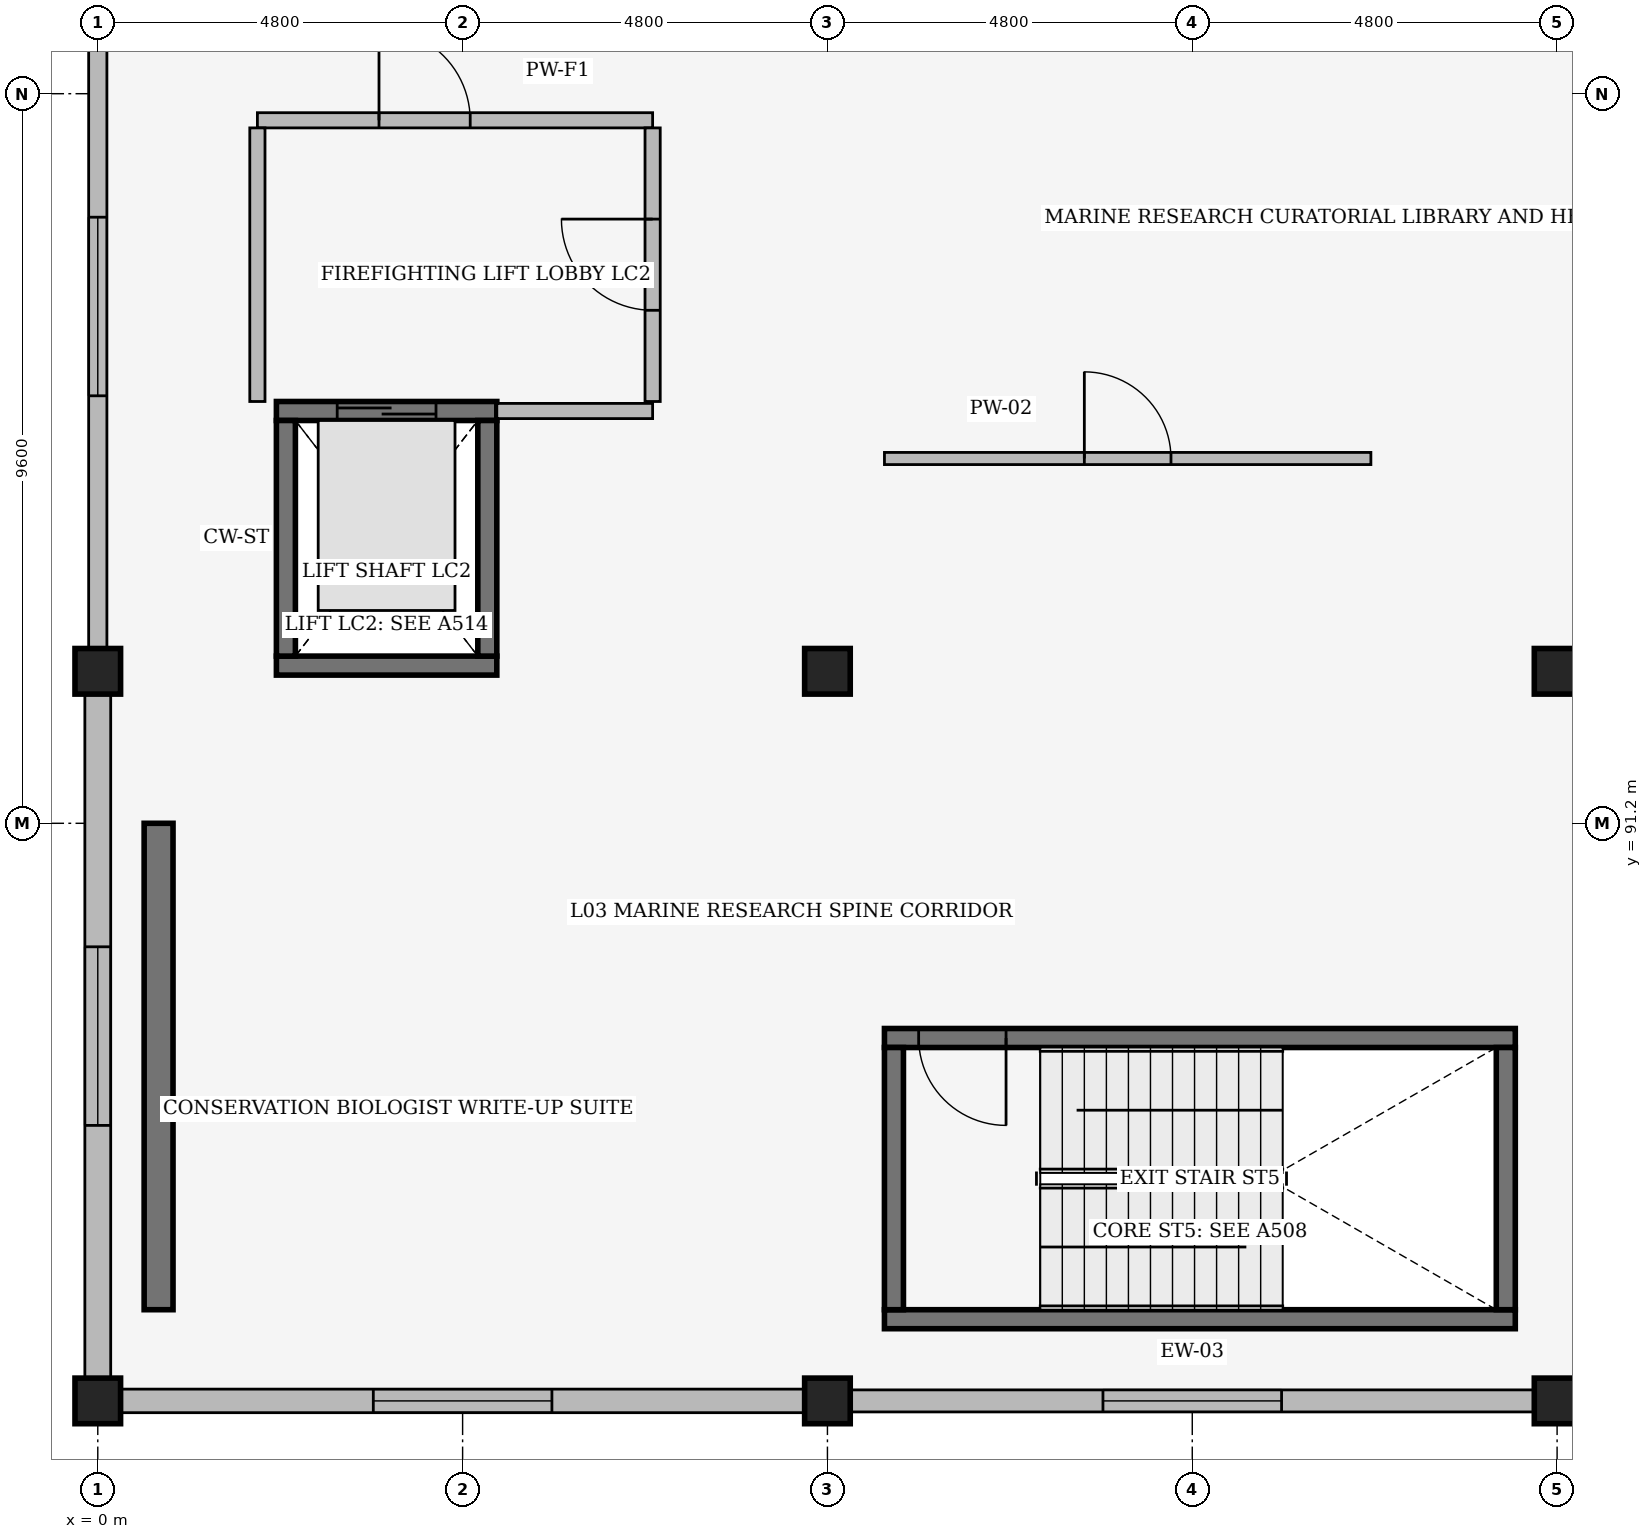
"""IFC4 building model, lengths in metres.
Left out: names, types, materials, properties, quantities, classifications, styles, units other than length and angle.
Written with IfcOpenShell. Run it as: python <this file> out.ifc"""

import sys

from ifc_helpers import new_model, si_unit, direction, frame, frame_2d, origin, origin_2d, place, context, subcontext, project, spatial, rectangle, extrude, element, fill, save


model = new_model("IFC4")
c1 = context("Model", 3, precision=1e-05, world=origin(), true_north=direction((0.0, 1.0)))
c2 = subcontext(c1, "Body", "Model", "MODEL_VIEW")
j1 = project(units=[si_unit("LENGTHUNIT", "METRE"), si_unit("PLANEANGLEUNIT", "RADIAN")], contexts=[c1])
p1 = place(None, origin())
s1 = spatial("IfcSite", under=j1, at=p1, CompositionType="ELEMENT")
p2 = place(p1, origin())
s2 = spatial("IfcBuilding", under=s1, at=p2, CompositionType="ELEMENT")
p3 = place(p2, frame((0.0, 0.0, 15.3)))
s3 = spatial("IfcBuildingStorey", under=s2, at=p3, CompositionType="ELEMENT", Elevation=15.3)
for number, where, z_axis, x_axis in (
    (1, (0.0, 83.6, 0.0), (0.0, 0.0, 1.0), (1.0, 0.0, 0.0)),
    (2, (0.0, 93.2, 0.0), (0.0, 0.0, 1.0), (1.0, 0.0, 0.0)),
    (3, (9.6, 83.6, 0.0), (0.0, 0.0, 1.0), (1.0, 0.0, 0.0)),
    (4, (9.6, 93.2, 0.0), (0.0, 0.0, 1.0), (1.0, 0.0, 0.0)),
    (5, (19.2, 83.6, 0.0), (0.0, 0.0, 1.0), (1.0, 0.0, 0.0)),
    (6, (19.2, 93.2, 0.0), (0.0, 0.0, 1.0), (1.0, 0.0, 0.0)),
):
    element("IfcColumn", number, at=place(p3, frame(where, z_axis=z_axis, x_axis=x_axis)), inside=s3, PredefinedType="COLUMN", context=c2, shape_type="SweptSolid", body=[
        extrude(rectangle(XDim=0.6, YDim=0.6, at=origin_2d()), origin(), (0.0, 0.0, 1.0), 4.5),
    ])
p4 = place(p3, frame((0.8, 84.8, 0.0), z_axis=(0.0, 0.0, 1.0), x_axis=(0.0, 1.0, 0.0)))
e7 = element("IfcWall", 7, at=p4, inside=s3, PredefinedType="SHEAR", context=c2, shape_type="SweptSolid", body=[
    extrude(rectangle(XDim=6.4, YDim=0.38, at=frame_2d((3.2, 0.0))), origin(), (0.0, 0.0, 1.0), 4.5),
])
p5 = place(p3, frame((0.0, 102.492, 0.0), z_axis=(0.0, 0.0, 1.0), x_axis=(0.0, -1.0, 0.0)))
e8 = element("IfcWall", 8, at=p5, inside=s3, PredefinedType="SOLIDWALL", context=c2, shape_type="SweptSolid", body=[
    extrude(rectangle(XDim=8.984, YDim=0.24, at=frame_2d((4.492, 0.0))), origin(), (0.0, 0.0, 1.0), 3.769),
])
p6 = place(p5, frame((3.317, 0.0, 0.95)))
e9 = element("IfcOpeningElement", 9, at=p6, cuts=e8, PredefinedType="OPENING", context=c2, shape_type="SweptSolid", body=[
    extrude(rectangle(XDim=2.35, YDim=1.2, at=frame_2d((1.175, 0.6))), frame((0.0, 0.13, 0.0), z_axis=(0.0, -1.0, 0.0), x_axis=(1.0, 0.0, 0.0)), (0.0, 0.0, 1.0), 0.26),
])
p7 = place(p3, frame((0.0, 92.892, 0.0), z_axis=(0.0, 0.0, 1.0), x_axis=(0.0, -1.0, 0.0)))
e10 = element("IfcWall", 10, at=p7, inside=s3, PredefinedType="SOLIDWALL", context=c2, shape_type="SweptSolid", body=[
    extrude(rectangle(XDim=8.984, YDim=0.34, at=frame_2d((4.492, 0.0))), origin(), (0.0, 0.0, 1.0), 3.769),
])
p8 = place(p7, frame((3.317, 0.0, 0.95)))
e11 = element("IfcOpeningElement", 11, at=p8, cuts=e10, PredefinedType="OPENING", context=c2, shape_type="SweptSolid", body=[
    extrude(rectangle(XDim=2.35, YDim=1.5, at=frame_2d((1.175, 0.75))), frame((0.0, 0.18, 0.0), z_axis=(0.0, -1.0, 0.0), x_axis=(1.0, 0.0, 0.0)), (0.0, 0.0, 1.0), 0.36),
])
p9 = place(p3, frame((0.308, 83.6, 0.0), z_axis=(0.0, 0.0, 1.0), x_axis=(1.0, 0.0, 0.0)))
e12 = element("IfcWall", 12, at=p9, inside=s3, PredefinedType="SOLIDWALL", context=c2, shape_type="SweptSolid", body=[
    extrude(rectangle(XDim=8.984, YDim=0.31, at=frame_2d((4.492, 0.0))), origin(), (0.0, 0.0, 1.0), 3.878),
])
p10 = place(p9, frame((3.317, 0.0, 0.95)))
e13 = element("IfcOpeningElement", 13, at=p10, cuts=e12, PredefinedType="OPENING", context=c2, shape_type="SweptSolid", body=[
    extrude(rectangle(XDim=2.35, YDim=1.8, at=frame_2d((1.175, 0.9))), frame((0.0, 0.165, 0.0), z_axis=(0.0, -1.0, 0.0), x_axis=(1.0, 0.0, 0.0)), (0.0, 0.0, 1.0), 0.33),
])
p11 = place(p3, frame((9.908, 83.6, 0.0), z_axis=(0.0, 0.0, 1.0), x_axis=(1.0, 0.0, 0.0)))
e14 = element("IfcWall", 14, at=p11, inside=s3, PredefinedType="SOLIDWALL", context=c2, shape_type="SweptSolid", body=[
    extrude(rectangle(XDim=8.984, YDim=0.29, at=frame_2d((4.492, 0.0))), origin(), (0.0, 0.0, 1.0), 3.575),
])
p12 = place(p11, frame((3.317, 0.0, 0.95)))
e15 = element("IfcOpeningElement", 15, at=p12, cuts=e14, PredefinedType="OPENING", context=c2, shape_type="SweptSolid", body=[
    extrude(rectangle(XDim=2.35, YDim=2.1, at=frame_2d((1.175, 1.05))), frame((0.0, 0.155, 0.0), z_axis=(0.0, -1.0, 0.0), x_axis=(1.0, 0.0, 0.0)), (0.0, 0.0, 1.0), 0.31),
])
p13 = place(p3, frame((10.35, 84.675, 0.0), z_axis=(0.0, 0.0, 1.0), x_axis=(1.0, 0.0, 0.0)))
e16 = element("IfcWall", 16, at=p13, inside=s3, PredefinedType="SHEAR", context=c2, shape_type="SweptSolid", body=[
    extrude(rectangle(XDim=8.3, YDim=0.25, at=frame_2d((4.15, 0.0))), origin(), (0.0, 0.0, 1.0), 4.22),
])
p14 = place(p3, frame((18.65, 88.375, 0.0), z_axis=(0.0, 0.0, 1.0), x_axis=(-1.0, 0.0, 0.0)))
e17 = element("IfcWall", 17, at=p14, inside=s3, PredefinedType="SHEAR", context=c2, shape_type="SweptSolid", body=[
    extrude(rectangle(XDim=8.3, YDim=0.25, at=frame_2d((4.15, 0.0))), origin(), (0.0, 0.0, 1.0), 4.22),
])
p15 = place(p14, frame((7.85, 0.0, 0.0), z_axis=(0.0, 0.0, 1.0), x_axis=(-1.0, 0.0, 0.0)))
e18 = element("IfcOpeningElement", 18, at=p15, cuts=e17, PredefinedType="OPENING", context=c2, shape_type="SweptSolid", body=[
    extrude(rectangle(XDim=1.15, YDim=2.2, at=frame_2d((0.575, 1.1))), frame((0.0, 0.135, 0.0), z_axis=(0.0, -1.0, 0.0), x_axis=(1.0, 0.0, 0.0)), (0.0, 0.0, 1.0), 0.27),
])
for number, where, z_axis, x_axis in (
    (19, (10.475, 88.25, 0.0), (0.0, 0.0, 1.0), (0.0, -1.0, 0.0)),
    (20, (18.525, 84.8, 0.0), (0.0, 0.0, 1.0), (0.0, 1.0, 0.0)),
):
    element("IfcWall", number, at=place(p3, frame(where, z_axis=z_axis, x_axis=x_axis)), inside=s3, PredefinedType="SHEAR", context=c2, shape_type="SweptSolid", body=[
        extrude(rectangle(XDim=3.45, YDim=0.25, at=frame_2d((1.725, 0.0))), origin(), (0.0, 0.0, 1.0), 4.22),
    ])
p16 = place(p3, frame((2.35, 93.275, 0.0), z_axis=(0.0, 0.0, 1.0), x_axis=(1.0, 0.0, 0.0)))
e21 = element("IfcWall", 21, at=p16, inside=s3, PredefinedType="SHEAR", context=c2, shape_type="SweptSolid", body=[
    extrude(rectangle(XDim=2.9, YDim=0.25, at=frame_2d((1.45, 0.0))), origin(), (0.0, 0.0, 1.0), 4.22),
])
p17 = place(p3, frame((2.35, 96.625, 0.0), z_axis=(0.0, 0.0, 1.0), x_axis=(1.0, 0.0, 0.0)))
e22 = element("IfcWall", 22, at=p17, inside=s3, PredefinedType="SHEAR", context=c2, shape_type="SweptSolid", body=[
    extrude(rectangle(XDim=2.9, YDim=0.25, at=frame_2d((1.45, 0.0))), origin(), (0.0, 0.0, 1.0), 4.22),
])
p18 = place(p17, frame((0.8, 0.0, 0.0)))
e23 = element("IfcOpeningElement", 23, at=p18, cuts=e22, PredefinedType="OPENING", context=c2, shape_type="SweptSolid", body=[
    extrude(rectangle(XDim=1.3, YDim=2.2, at=frame_2d((0.65, 1.1))), frame((0.0, 0.135, 0.0), z_axis=(0.0, -1.0, 0.0), x_axis=(1.0, 0.0, 0.0)), (0.0, 0.0, 1.0), 0.27),
])
for number, where, z_axis, x_axis in (
    (24, (2.475, 93.4, 0.0), (0.0, 0.0, 1.0), (0.0, 1.0, 0.0)),
    (25, (5.125, 93.4, 0.0), (0.0, 0.0, 1.0), (0.0, 1.0, 0.0)),
):
    element("IfcWall", number, at=place(p3, frame(where, z_axis=z_axis, x_axis=x_axis)), inside=s3, PredefinedType="SHEAR", context=c2, shape_type="SweptSolid", body=[
        extrude(rectangle(XDim=3.1, YDim=0.25, at=frame_2d((1.55, 0.0))), origin(), (0.0, 0.0, 1.0), 4.22),
    ])
p19 = place(p3, frame((2.1, 100.45, 0.0), z_axis=(0.0, 0.0, 1.0), x_axis=(1.0, 0.0, 0.0)))
e26 = element("IfcWall", 26, at=p19, inside=s3, PredefinedType="PARTITIONING", context=c2, shape_type="SweptSolid", body=[
    extrude(rectangle(XDim=5.2, YDim=0.2, at=frame_2d((2.6, 0.0))), origin(), (0.0, 0.0, 1.0), 3.833),
])
p20 = place(p19, frame((1.6, 0.0, 0.0)))
e27 = element("IfcOpeningElement", 27, at=p20, cuts=e26, PredefinedType="OPENING", context=c2, shape_type="SweptSolid", body=[
    extrude(rectangle(XDim=1.2, YDim=2.2, at=frame_2d((0.6, 1.1))), frame((0.0, 0.11, 0.0), z_axis=(0.0, -1.0, 0.0), x_axis=(1.0, 0.0, 0.0)), (0.0, 0.0, 1.0), 0.22),
])
p21 = place(p3, frame((2.1, 96.75, 0.0), z_axis=(0.0, 0.0, 1.0), x_axis=(0.0, 1.0, 0.0)))
e28 = element("IfcWall", 28, at=p21, inside=s3, PredefinedType="PARTITIONING", context=c2, shape_type="SweptSolid", body=[
    extrude(rectangle(XDim=3.6, YDim=0.2, at=frame_2d((1.8, 0.0))), origin(), (0.0, 0.0, 1.0), 3.769),
])
p22 = place(p3, frame((7.3, 96.75, 0.0), z_axis=(0.0, 0.0, 1.0), x_axis=(0.0, 1.0, 0.0)))
e29 = element("IfcWall", 29, at=p22, inside=s3, PredefinedType="PARTITIONING", context=c2, shape_type="SweptSolid", body=[
    extrude(rectangle(XDim=3.6, YDim=0.2, at=frame_2d((1.8, 0.0))), origin(), (0.0, 0.0, 1.0), 3.769),
])
p23 = place(p22, frame((1.2, 0.0, 0.0)))
e30 = element("IfcOpeningElement", 30, at=p23, cuts=e29, PredefinedType="OPENING", context=c2, shape_type="SweptSolid", body=[
    extrude(rectangle(XDim=1.2, YDim=2.2, at=frame_2d((0.6, 1.1))), frame((0.0, 0.11, 0.0), z_axis=(0.0, -1.0, 0.0), x_axis=(1.0, 0.0, 0.0)), (0.0, 0.0, 1.0), 0.22),
])
p24 = place(p3, frame((5.25, 96.625, 0.0), z_axis=(0.0, 0.0, 1.0), x_axis=(1.0, 0.0, 0.0)))
e31 = element("IfcWall", 31, at=p24, inside=s3, PredefinedType="PARTITIONING", context=c2, shape_type="SweptSolid", body=[
    extrude(rectangle(XDim=2.05, YDim=0.2, at=frame_2d((1.025, 0.0))), origin(), (0.0, 0.0, 1.0), 4.14),
])
p25 = place(p3, frame((10.35, 96.0, 0.0), z_axis=(0.0, 0.0, 1.0), x_axis=(1.0, 0.0, 0.0)))
e32 = element("IfcWall", 32, at=p25, inside=s3, PredefinedType="PARTITIONING", context=c2, shape_type="SweptSolid", body=[
    extrude(rectangle(XDim=6.4, YDim=0.16, at=frame_2d((3.2, 0.0))), origin(), (0.0, 0.0, 1.0), 3.876),
])
p26 = place(p25, frame((2.63, 0.0, 0.0)))
e33 = element("IfcOpeningElement", 33, at=p26, cuts=e32, PredefinedType="OPENING", context=c2, shape_type="SweptSolid", body=[
    extrude(rectangle(XDim=1.14, YDim=2.22, at=frame_2d((0.57, 1.11))), frame((0.0, 0.09, 0.0), z_axis=(0.0, -1.0, 0.0), x_axis=(1.0, 0.0, 0.0)), (0.0, 0.0, 1.0), 0.18),
])
p27 = place(p6, origin())
e34 = element("IfcWindow", 34, at=p27, inside=s3, PartitioningType="SINGLE_PANEL", PredefinedType="WINDOW", context=c2, shape_type="SweptSolid", body=[
    extrude(rectangle(XDim=2.35, YDim=1.2, at=frame_2d((1.175, 0.6))), frame((0.0, 0.03, 0.0), z_axis=(0.0, -1.0, 0.0), x_axis=(1.0, 0.0, 0.0)), (0.0, 0.0, 1.0), 0.06),
])
fill(e9, e34)
p28 = place(p8, origin())
e35 = element("IfcWindow", 35, at=p28, inside=s3, PartitioningType="SINGLE_PANEL", PredefinedType="WINDOW", context=c2, shape_type="SweptSolid", body=[
    extrude(rectangle(XDim=2.35, YDim=1.5, at=frame_2d((1.175, 0.75))), frame((0.0, 0.03, 0.0), z_axis=(0.0, -1.0, 0.0), x_axis=(1.0, 0.0, 0.0)), (0.0, 0.0, 1.0), 0.06),
])
fill(e11, e35)
p29 = place(p10, origin())
e36 = element("IfcWindow", 36, at=p29, inside=s3, PartitioningType="SINGLE_PANEL", PredefinedType="WINDOW", context=c2, shape_type="SweptSolid", body=[
    extrude(rectangle(XDim=2.35, YDim=1.8, at=frame_2d((1.175, 0.9))), frame((0.0, 0.03, 0.0), z_axis=(0.0, -1.0, 0.0), x_axis=(1.0, 0.0, 0.0)), (0.0, 0.0, 1.0), 0.06),
])
fill(e13, e36)
p30 = place(p12, origin())
e37 = element("IfcWindow", 37, at=p30, inside=s3, PartitioningType="SINGLE_PANEL", PredefinedType="WINDOW", context=c2, shape_type="SweptSolid", body=[
    extrude(rectangle(XDim=2.35, YDim=2.1, at=frame_2d((1.175, 1.05))), frame((0.0, 0.03, 0.0), z_axis=(0.0, -1.0, 0.0), x_axis=(1.0, 0.0, 0.0)), (0.0, 0.0, 1.0), 0.06),
])
fill(e15, e37)
p31 = place(p15, origin())
e38 = element("IfcDoor", 38, at=p31, inside=s3, OperationType="SINGLE_SWING_RIGHT", PredefinedType="DOOR", context=c2, shape_type="SweptSolid", body=[
    extrude(rectangle(XDim=1.15, YDim=2.2, at=frame_2d((0.575, 1.1))), frame((0.0, 0.025, 0.0), z_axis=(0.0, -1.0, 0.0), x_axis=(1.0, 0.0, 0.0)), (0.0, 0.0, 1.0), 0.05),
])
fill(e18, e38)
p32 = place(p18, origin())
e39 = element("IfcDoor", 39, at=p32, inside=s3, OperationType="DOUBLE_DOOR_SLIDING", PredefinedType="DOOR", context=c2, shape_type="SweptSolid", body=[
    extrude(rectangle(XDim=1.3, YDim=2.2, at=frame_2d((0.65, 1.1))), frame((0.0, 0.025, 0.0), z_axis=(0.0, -1.0, 0.0), x_axis=(1.0, 0.0, 0.0)), (0.0, 0.0, 1.0), 0.05),
])
fill(e23, e39)
p33 = place(p23, origin())
e40 = element("IfcDoor", 40, at=p33, inside=s3, OperationType="SINGLE_SWING_RIGHT", PredefinedType="DOOR", context=c2, shape_type="SweptSolid", body=[
    extrude(rectangle(XDim=1.2, YDim=2.2, at=frame_2d((0.6, 1.1))), frame((0.0, 0.025, 0.0), z_axis=(0.0, -1.0, 0.0), x_axis=(1.0, 0.0, 0.0)), (0.0, 0.0, 1.0), 0.05),
])
fill(e30, e40)
p34 = place(p20, origin())
e41 = element("IfcDoor", 41, at=p34, inside=s3, OperationType="SINGLE_SWING_LEFT", PredefinedType="DOOR", context=c2, shape_type="SweptSolid", body=[
    extrude(rectangle(XDim=1.2, YDim=2.2, at=frame_2d((0.6, 1.1))), frame((0.0, 0.025, 0.0), z_axis=(0.0, -1.0, 0.0), x_axis=(1.0, 0.0, 0.0)), (0.0, 0.0, 1.0), 0.05),
])
fill(e27, e41)
p35 = place(p26, origin())
e42 = element("IfcDoor", 42, at=p35, inside=s3, OperationType="SINGLE_SWING_LEFT", PredefinedType="DOOR", context=c2, shape_type="SweptSolid", body=[
    extrude(rectangle(XDim=1.14, YDim=2.22, at=frame_2d((0.57, 1.11))), frame((0.0, 0.025, 0.0), z_axis=(0.0, -1.0, 0.0), x_axis=(1.0, 0.0, 0.0)), (0.0, 0.0, 1.0), 0.05),
])
fill(e33, e42)
save(model, sys.argv[1])
